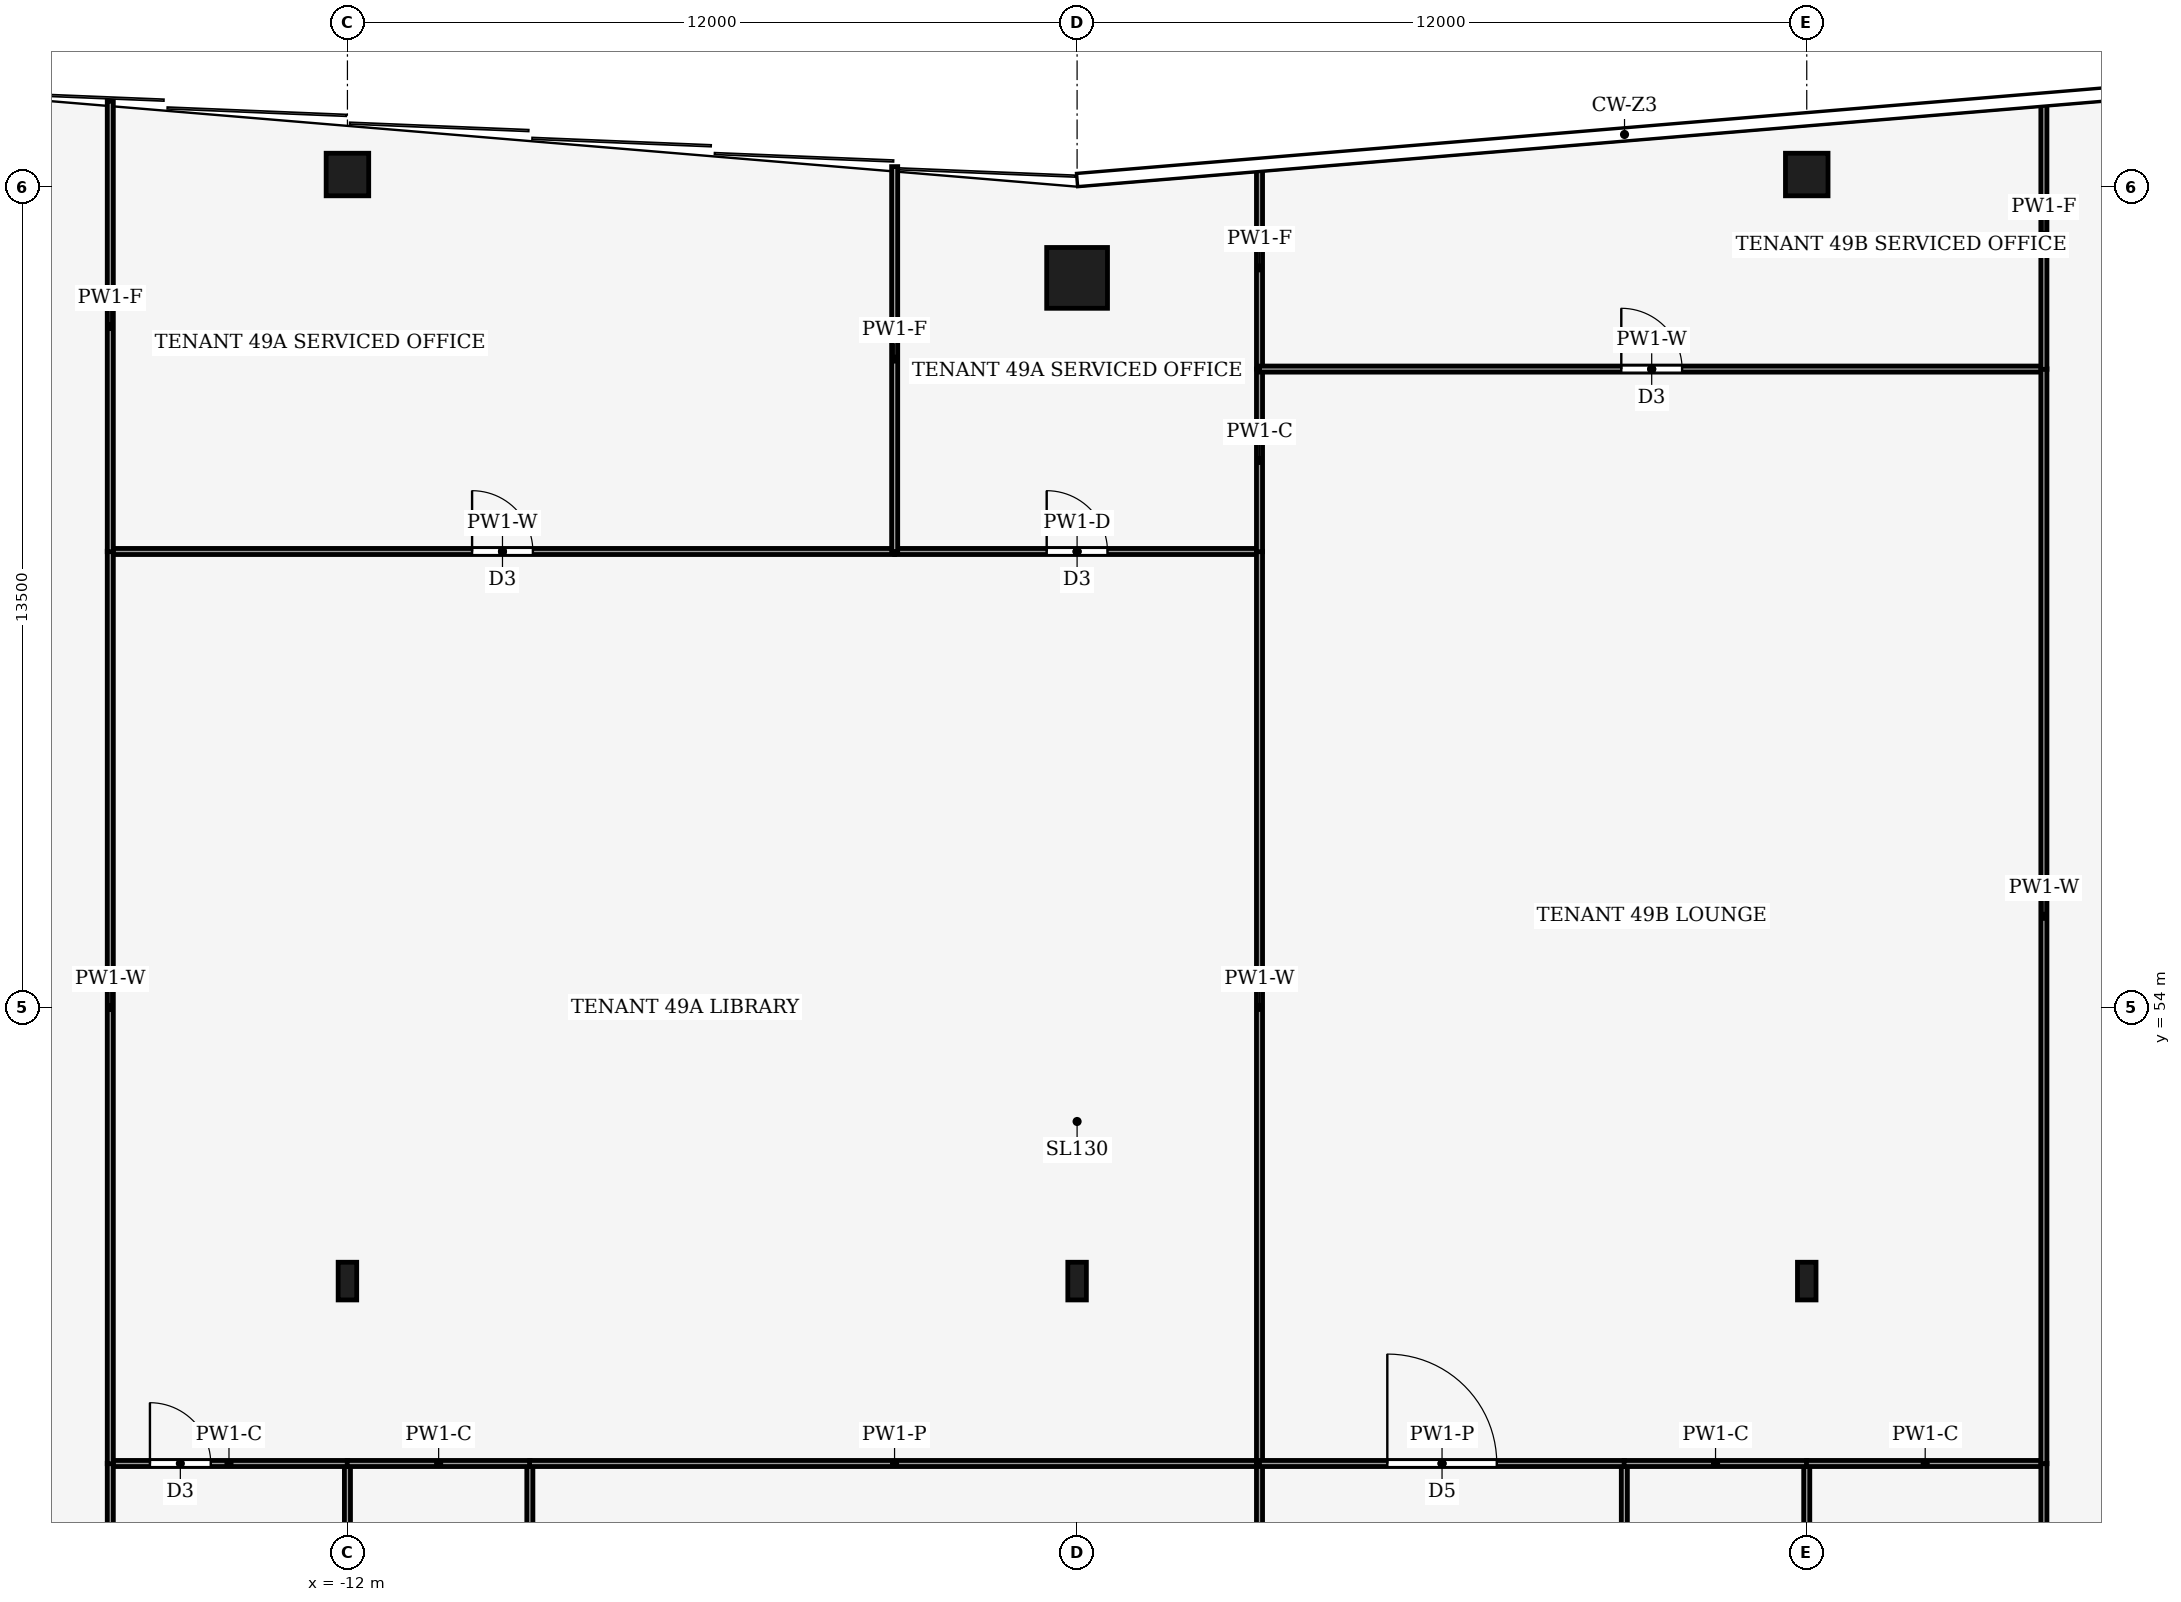
"""IFC4 building model, lengths in metres.
Left out: names, types, materials, properties, quantities, classifications, styles, units other than length and angle.
Written with IfcOpenShell. Run it as: python <this file> out.ifc"""

import sys

from ifc_helpers import new_model, si_unit, direction, frame, frame_2d, origin, origin_2d, place, context, subcontext, project, spatial, rectangle, hollow_rectangle, i_section, extrude, element, fill, save


model = new_model("IFC4")
c1 = context("Model", 3, precision=1e-05, world=origin(), true_north=direction((0.0, 1.0)))
c2 = subcontext(c1, "Body", "Model", "MODEL_VIEW")
j1 = project(units=[si_unit("LENGTHUNIT", "METRE"), si_unit("PLANEANGLEUNIT", "RADIAN")], contexts=[c1])
p1 = place(None, origin())
s1 = spatial("IfcSite", under=j1, at=p1, CompositionType="ELEMENT")
p2 = place(p1, origin())
s2 = spatial("IfcBuilding", under=s1, at=p2, CompositionType="ELEMENT")
p3 = place(p2, frame((0.0, 0.0, 214.0)))
s3 = spatial("IfcBuildingStorey", under=s2, at=p3, CompositionType="ELEMENT", Elevation=214.0)
p4 = place(p3, frame((0.0, 66.0, 0.0), z_axis=(0.0, 0.0, 1.0), x_axis=(1.0, 0.0, 0.0)))
e1 = element("IfcColumn", 1, at=p4, inside=s3, PredefinedType="COLUMN", context=c2, shape_type="SweptSolid", body=[
    extrude(hollow_rectangle(XDim=1.0, YDim=1.0, WallThickness=0.06, at=origin_2d()), origin(), (0.0, 0.0, 1.0), 4.0),
])
for number, where, z_axis, x_axis in (
    (2, (-12.0, 67.7, 0.0), (0.0, 0.0, 1.0), (1.0, 0.0, 0.0)),
    (3, (12.0, 67.7, 0.0), (0.0, 0.0, 1.0), (1.0, 0.0, 0.0)),
):
    element("IfcColumn", number, at=place(p3, frame(where, z_axis=z_axis, x_axis=x_axis)), inside=s3, PredefinedType="COLUMN", context=c2, shape_type="SweptSolid", body=[
        extrude(hollow_rectangle(XDim=0.7, YDim=0.7, WallThickness=0.03, at=origin_2d()), origin(), (0.0, 0.0, 1.0), 4.0),
    ])
for number, where, z_axis, x_axis in (
    (4, (-12.0, 49.5, 0.0), (0.0, 0.0, 1.0), (1.0, 0.0, 0.0)),
    (5, (0.0, 49.5, 0.0), (0.0, 0.0, 1.0), (1.0, 0.0, 0.0)),
    (6, (12.0, 49.5, 0.0), (0.0, 0.0, 1.0), (1.0, 0.0, 0.0)),
):
    element("IfcColumn", number, at=place(p3, frame(where, z_axis=z_axis, x_axis=x_axis)), inside=s3, PredefinedType="COLUMN", context=c2, shape_type="SweptSolid", body=[
        extrude(i_section(OverallWidth=0.305, OverallDepth=0.62, WebThickness=0.021, FlangeThickness=0.04, FilletRadius=0.027, at=origin_2d()), origin(), (0.0, 0.0, 1.0), 4.0),
    ])
p5 = place(p3, frame((-12.0, 46.5, 0.0), z_axis=(0.0, 0.0, 1.0), x_axis=(0.0, -1.0, 0.0)))
e7 = element("IfcWall", 7, at=p5, inside=s3, PredefinedType="PARTITIONING", context=c2, shape_type="SweptSolid", body=[
    extrude(rectangle(XDim=5.6, YDim=0.1, at=frame_2d((2.8, 0.0))), origin(), (0.0, 0.0, 1.0), 3.44),
])
p6 = place(p5, frame((2.3, 0.0, 0.0)))
e8 = element("IfcOpeningElement", 8, at=p6, cuts=e7, PredefinedType="OPENING", context=c2, shape_type="SweptSolid", body=[
    extrude(rectangle(XDim=1.0, YDim=2.1, at=frame_2d((0.5, 1.05))), frame((0.0, 0.06, 0.0), z_axis=(0.0, -1.0, 0.0), x_axis=(1.0, 0.0, 0.0)), (0.0, 0.0, 1.0), 0.12),
])
p7 = place(p3, frame((-15.9, 46.5, 0.0), z_axis=(0.0, 0.0, 1.0), x_axis=(1.0, 0.0, 0.0)))
e9 = element("IfcWall", 9, at=p7, inside=s3, PredefinedType="PARTITIONING", context=c2, shape_type="SweptSolid", body=[
    extrude(rectangle(XDim=3.904, YDim=0.1, at=frame_2d((1.952, 0.0))), origin(), (0.0, 0.0, 1.0), 3.87),
])
p8 = place(p7, frame((0.652, 0.0, 0.0)))
e10 = element("IfcOpeningElement", 10, at=p8, cuts=e9, PredefinedType="OPENING", context=c2, shape_type="SweptSolid", body=[
    extrude(rectangle(XDim=1.0, YDim=2.1, at=frame_2d((0.5, 1.05))), frame((0.0, 0.06, 0.0), z_axis=(0.0, -1.0, 0.0), x_axis=(1.0, 0.0, 0.0)), (0.0, 0.0, 1.0), 0.12),
])
p9 = place(p3, frame((-15.9, 46.504, 0.0), z_axis=(0.0, 0.0, 1.0), x_axis=(0.0, -1.0, 0.0)))
e11 = element("IfcWall", 11, at=p9, inside=s3, PredefinedType="PARTITIONING", context=c2, shape_type="SweptSolid", body=[
    extrude(rectangle(XDim=5.608, YDim=0.1, at=frame_2d((2.804, 0.0))), origin(), (0.0, 0.0, 1.0), 3.44),
])
p10 = place(p3, frame((-9.0, 40.9, 0.0), z_axis=(0.0, 0.0, 1.0), x_axis=(0.0, 1.0, 0.0)))
e12 = element("IfcWall", 12, at=p10, inside=s3, PredefinedType="PARTITIONING", context=c2, shape_type="SweptSolid", body=[
    extrude(rectangle(XDim=5.6, YDim=0.1, at=frame_2d((2.8, 0.0))), origin(), (0.0, 0.0, 1.0), 3.87),
])
p11 = place(p3, frame((-8.996, 46.5, 0.0), z_axis=(0.0, 0.0, 1.0), x_axis=(-1.0, 0.0, 0.0)))
e13 = element("IfcWall", 13, at=p11, inside=s3, PredefinedType="PARTITIONING", context=c2, shape_type="SweptSolid", body=[
    extrude(rectangle(XDim=3.008, YDim=0.1, at=frame_2d((1.504, 0.0))), origin(), (0.0, 0.0, 1.0), 3.87),
])
p12 = place(p3, frame((3.0, 46.5, 0.0), z_axis=(0.0, 0.0, 1.0), x_axis=(-1.0, 0.0, 0.0)))
e14 = element("IfcWall", 14, at=p12, inside=s3, PredefinedType="PARTITIONING", context=c2, shape_type="SweptSolid", body=[
    extrude(rectangle(XDim=12.004, YDim=0.1, at=frame_2d((6.002, 0.0))), origin(), (0.0, 0.0, 1.0), 3.44),
])
p13 = place(p3, frame((3.0, 40.9, 0.0), z_axis=(0.0, 0.0, 1.0), x_axis=(0.0, 1.0, 0.0)))
e15 = element("IfcWall", 15, at=p13, inside=s3, PredefinedType="PARTITIONING", context=c2, shape_type="SweptSolid", body=[
    extrude(rectangle(XDim=5.6, YDim=0.1, at=frame_2d((2.8, 0.0))), origin(), (0.0, 0.0, 1.0), 3.87),
])
p14 = place(p3, frame((-15.9, 61.5, 0.0), z_axis=(0.0, 0.0, 1.0), x_axis=(1.0, 0.0, 0.0)))
e16 = element("IfcWall", 16, at=p14, inside=s3, PredefinedType="PARTITIONING", context=c2, shape_type="SweptSolid", body=[
    extrude(rectangle(XDim=12.9, YDim=0.1, at=frame_2d((6.45, 0.0))), origin(), (0.0, 0.0, 1.0), 3.24),
])
p15 = place(p14, frame((5.95, 0.0, 0.0)))
e17 = element("IfcOpeningElement", 17, at=p15, cuts=e16, PredefinedType="OPENING", context=c2, shape_type="SweptSolid", body=[
    extrude(rectangle(XDim=1.0, YDim=2.1, at=frame_2d((0.5, 1.05))), frame((0.0, 0.06, 0.0), z_axis=(0.0, -1.0, 0.0), x_axis=(1.0, 0.0, 0.0)), (0.0, 0.0, 1.0), 0.12),
])
p16 = place(p3, frame((-3.0, 61.5, 0.0), z_axis=(0.0, 0.0, 1.0), x_axis=(1.0, 0.0, 0.0)))
e18 = element("IfcWall", 18, at=p16, inside=s3, PredefinedType="PARTITIONING", context=c2, shape_type="SweptSolid", body=[
    extrude(rectangle(XDim=6.0, YDim=0.1, at=frame_2d((3.0, 0.0))), origin(), (0.0, 0.0, 1.0), 3.29),
])
p17 = place(p16, frame((2.5, 0.0, 0.0)))
e19 = element("IfcOpeningElement", 19, at=p17, cuts=e18, PredefinedType="OPENING", context=c2, shape_type="SweptSolid", body=[
    extrude(rectangle(XDim=1.0, YDim=2.1, at=frame_2d((0.5, 1.05))), frame((0.0, 0.06, 0.0), z_axis=(0.0, -1.0, 0.0), x_axis=(1.0, 0.0, 0.0)), (0.0, 0.0, 1.0), 0.12),
])
p18 = place(p3, frame((3.0, 46.5, 0.0), z_axis=(0.0, 0.0, 1.0), x_axis=(0.0, 1.0, 0.0)))
e20 = element("IfcWall", 20, at=p18, inside=s3, PredefinedType="PARTITIONING", context=c2, shape_type="SweptSolid", body=[
    extrude(rectangle(XDim=15.004, YDim=0.1, at=frame_2d((7.502, 0.0))), origin(), (0.0, 0.0, 1.0), 3.24),
])
p19 = place(p3, frame((-15.9, 61.504, 0.0), z_axis=(0.0, 0.0, 1.0), x_axis=(0.0, -1.0, 0.0)))
e21 = element("IfcWall", 21, at=p19, inside=s3, PredefinedType="PARTITIONING", context=c2, shape_type="SweptSolid", body=[
    extrude(rectangle(XDim=15.008, YDim=0.1, at=frame_2d((7.504, 0.0))), origin(), (0.0, 0.0, 1.0), 3.24),
])
p20 = place(p3, frame((-3.0, 61.5, 0.0), z_axis=(0.0, 0.0, 1.0), x_axis=(0.0, 1.0, 0.0)))
e22 = element("IfcWall", 22, at=p20, inside=s3, PredefinedType="PARTITIONING", context=c2, shape_type="SweptSolid", body=[
    extrude(rectangle(XDim=6.33, YDim=0.1, at=frame_2d((3.165, 0.0))), origin(), (0.0, 0.0, 1.0), 3.04),
])
p21 = place(p3, frame((-15.9, 68.905, 0.0), z_axis=(0.0, 0.0, 1.0), x_axis=(0.0, -1.0, 0.0)))
e23 = element("IfcWall", 23, at=p21, inside=s3, PredefinedType="PARTITIONING", context=c2, shape_type="SweptSolid", body=[
    extrude(rectangle(XDim=7.409, YDim=0.1, at=frame_2d((3.705, 0.0))), origin(), (0.0, 0.0, 1.0), 3.04),
])
p22 = place(p3, frame((3.0, 61.496, 0.0), z_axis=(0.0, 0.0, 1.0), x_axis=(0.0, 1.0, 0.0)))
e24 = element("IfcWall", 24, at=p22, inside=s3, PredefinedType="PARTITIONING", context=c2, shape_type="SweptSolid", body=[
    extrude(rectangle(XDim=3.004, YDim=0.1, at=frame_2d((1.502, 0.0))), origin(), (0.0, 0.0, 1.0), 3.87),
])
p23 = place(p3, frame((3.0, 64.5, 0.0), z_axis=(0.0, 0.0, 1.0), x_axis=(0.0, 1.0, 0.0)))
e25 = element("IfcWall", 25, at=p23, inside=s3, PredefinedType="PARTITIONING", context=c2, shape_type="SweptSolid", body=[
    extrude(rectangle(XDim=3.33, YDim=0.1, at=frame_2d((1.665, 0.0))), origin(), (0.0, 0.0, 1.0), 3.04),
])
p24 = place(p3, frame((9.0, 46.5, 0.0), z_axis=(0.0, 0.0, 1.0), x_axis=(0.0, -1.0, 0.0)))
e26 = element("IfcWall", 26, at=p24, inside=s3, PredefinedType="PARTITIONING", context=c2, shape_type="SweptSolid", body=[
    extrude(rectangle(XDim=5.6, YDim=0.1, at=frame_2d((2.8, 0.0))), origin(), (0.0, 0.0, 1.0), 3.87),
])
p25 = place(p24, frame((2.3, 0.0, 0.0)))
e27 = element("IfcOpeningElement", 27, at=p25, cuts=e26, PredefinedType="OPENING", context=c2, shape_type="SweptSolid", body=[
    extrude(rectangle(XDim=1.0, YDim=2.1, at=frame_2d((0.5, 1.05))), frame((0.0, 0.06, 0.0), z_axis=(0.0, -1.0, 0.0), x_axis=(1.0, 0.0, 0.0)), (0.0, 0.0, 1.0), 0.12),
])
p26 = place(p3, frame((3.0, 46.5, 0.0), z_axis=(0.0, 0.0, 1.0), x_axis=(1.0, 0.0, 0.0)))
e28 = element("IfcWall", 28, at=p26, inside=s3, PredefinedType="PARTITIONING", context=c2, shape_type="SweptSolid", body=[
    extrude(rectangle(XDim=6.004, YDim=0.1, at=frame_2d((3.002, 0.0))), origin(), (0.0, 0.0, 1.0), 3.44),
])
p27 = place(p26, frame((2.102, 0.0, 0.0)))
e29 = element("IfcOpeningElement", 29, at=p27, cuts=e28, PredefinedType="OPENING", context=c2, shape_type="SweptSolid", body=[
    extrude(rectangle(XDim=1.8, YDim=2.1, at=frame_2d((0.9, 1.05))), frame((0.0, 0.06, 0.0), z_axis=(0.0, -1.0, 0.0), x_axis=(1.0, 0.0, 0.0)), (0.0, 0.0, 1.0), 0.12),
])
p28 = place(p3, frame((12.0, 40.9, 0.0), z_axis=(0.0, 0.0, 1.0), x_axis=(0.0, 1.0, 0.0)))
e30 = element("IfcWall", 30, at=p28, inside=s3, PredefinedType="PARTITIONING", context=c2, shape_type="SweptSolid", body=[
    extrude(rectangle(XDim=5.6, YDim=0.1, at=frame_2d((2.8, 0.0))), origin(), (0.0, 0.0, 1.0), 3.44),
])
p29 = place(p3, frame((12.004, 46.5, 0.0), z_axis=(0.0, 0.0, 1.0), x_axis=(-1.0, 0.0, 0.0)))
e31 = element("IfcWall", 31, at=p29, inside=s3, PredefinedType="PARTITIONING", context=c2, shape_type="SweptSolid", body=[
    extrude(rectangle(XDim=3.008, YDim=0.1, at=frame_2d((1.504, 0.0))), origin(), (0.0, 0.0, 1.0), 3.87),
])
p30 = place(p3, frame((15.9, 46.5, 0.0), z_axis=(0.0, 0.0, 1.0), x_axis=(-1.0, 0.0, 0.0)))
e32 = element("IfcWall", 32, at=p30, inside=s3, PredefinedType="PARTITIONING", context=c2, shape_type="SweptSolid", body=[
    extrude(rectangle(XDim=3.904, YDim=0.1, at=frame_2d((1.952, 0.0))), origin(), (0.0, 0.0, 1.0), 3.87),
])
p31 = place(p3, frame((15.9, 40.896, 0.0), z_axis=(0.0, 0.0, 1.0), x_axis=(0.0, 1.0, 0.0)))
e33 = element("IfcWall", 33, at=p31, inside=s3, PredefinedType="PARTITIONING", context=c2, shape_type="SweptSolid", body=[
    extrude(rectangle(XDim=5.608, YDim=0.1, at=frame_2d((2.804, 0.0))), origin(), (0.0, 0.0, 1.0), 3.44),
])
p32 = place(p3, frame((3.0, 64.5, 0.0), z_axis=(0.0, 0.0, 1.0), x_axis=(1.0, 0.0, 0.0)))
e34 = element("IfcWall", 34, at=p32, inside=s3, PredefinedType="PARTITIONING", context=c2, shape_type="SweptSolid", body=[
    extrude(rectangle(XDim=12.9, YDim=0.1, at=frame_2d((6.45, 0.0))), origin(), (0.0, 0.0, 1.0), 3.24),
])
p33 = place(p32, frame((5.95, 0.0, 0.0)))
e35 = element("IfcOpeningElement", 35, at=p33, cuts=e34, PredefinedType="OPENING", context=c2, shape_type="SweptSolid", body=[
    extrude(rectangle(XDim=1.0, YDim=2.1, at=frame_2d((0.5, 1.05))), frame((0.0, 0.06, 0.0), z_axis=(0.0, -1.0, 0.0), x_axis=(1.0, 0.0, 0.0)), (0.0, 0.0, 1.0), 0.12),
])
p34 = place(p3, frame((15.9, 46.496, 0.0), z_axis=(0.0, 0.0, 1.0), x_axis=(0.0, 1.0, 0.0)))
e36 = element("IfcWall", 36, at=p34, inside=s3, PredefinedType="PARTITIONING", context=c2, shape_type="SweptSolid", body=[
    extrude(rectangle(XDim=18.008, YDim=0.1, at=frame_2d((9.004, 0.0))), origin(), (0.0, 0.0, 1.0), 3.24),
])
p35 = place(p3, frame((15.9, 64.496, 0.0), z_axis=(0.0, 0.0, 1.0), x_axis=(0.0, 1.0, 0.0)))
e37 = element("IfcWall", 37, at=p35, inside=s3, PredefinedType="PARTITIONING", context=c2, shape_type="SweptSolid", body=[
    extrude(rectangle(XDim=4.409, YDim=0.1, at=frame_2d((2.205, 0.0))), origin(), (0.0, 0.0, 1.0), 3.04),
])
p36 = place(p8, origin())
e38 = element("IfcDoor", 38, at=p36, inside=s3, OperationType="SINGLE_SWING_LEFT", PredefinedType="DOOR", context=c2, shape_type="SweptSolid", body=[
    extrude(rectangle(XDim=1.0, YDim=2.1, at=frame_2d((0.5, 1.05))), frame((0.0, 0.025, 0.0), z_axis=(0.0, -1.0, 0.0), x_axis=(1.0, 0.0, 0.0)), (0.0, 0.0, 1.0), 0.05),
])
fill(e10, e38)
p37 = place(p15, origin())
e39 = element("IfcDoor", 39, at=p37, inside=s3, OperationType="SINGLE_SWING_RIGHT", PredefinedType="DOOR", context=c2, shape_type="SweptSolid", body=[
    extrude(rectangle(XDim=1.0, YDim=2.1, at=frame_2d((0.5, 1.05))), frame((0.0, 0.025, 0.0), z_axis=(0.0, -1.0, 0.0), x_axis=(1.0, 0.0, 0.0)), (0.0, 0.0, 1.0), 0.05),
])
fill(e17, e39)
p38 = place(p17, origin())
e40 = element("IfcDoor", 40, at=p38, inside=s3, OperationType="SINGLE_SWING_LEFT", PredefinedType="DOOR", context=c2, shape_type="SweptSolid", body=[
    extrude(rectangle(XDim=1.0, YDim=2.1, at=frame_2d((0.5, 1.05))), frame((0.0, 0.025, 0.0), z_axis=(0.0, -1.0, 0.0), x_axis=(1.0, 0.0, 0.0)), (0.0, 0.0, 1.0), 0.05),
])
fill(e19, e40)
p39 = place(p27, origin())
e41 = element("IfcDoor", 41, at=p39, inside=s3, OperationType="DOUBLE_DOOR_SINGLE_SWING", PredefinedType="DOOR", context=c2, shape_type="SweptSolid", body=[
    extrude(rectangle(XDim=1.8, YDim=2.1, at=frame_2d((0.9, 1.05))), frame((0.0, 0.025, 0.0), z_axis=(0.0, -1.0, 0.0), x_axis=(1.0, 0.0, 0.0)), (0.0, 0.0, 1.0), 0.05),
])
fill(e29, e41)
p40 = place(p33, origin())
e42 = element("IfcDoor", 42, at=p40, inside=s3, OperationType="SINGLE_SWING_RIGHT", PredefinedType="DOOR", context=c2, shape_type="SweptSolid", body=[
    extrude(rectangle(XDim=1.0, YDim=2.1, at=frame_2d((0.5, 1.05))), frame((0.0, 0.025, 0.0), z_axis=(0.0, -1.0, 0.0), x_axis=(1.0, 0.0, 0.0)), (0.0, 0.0, 1.0), 0.05),
])
fill(e35, e42)
save(model, sys.argv[1])
